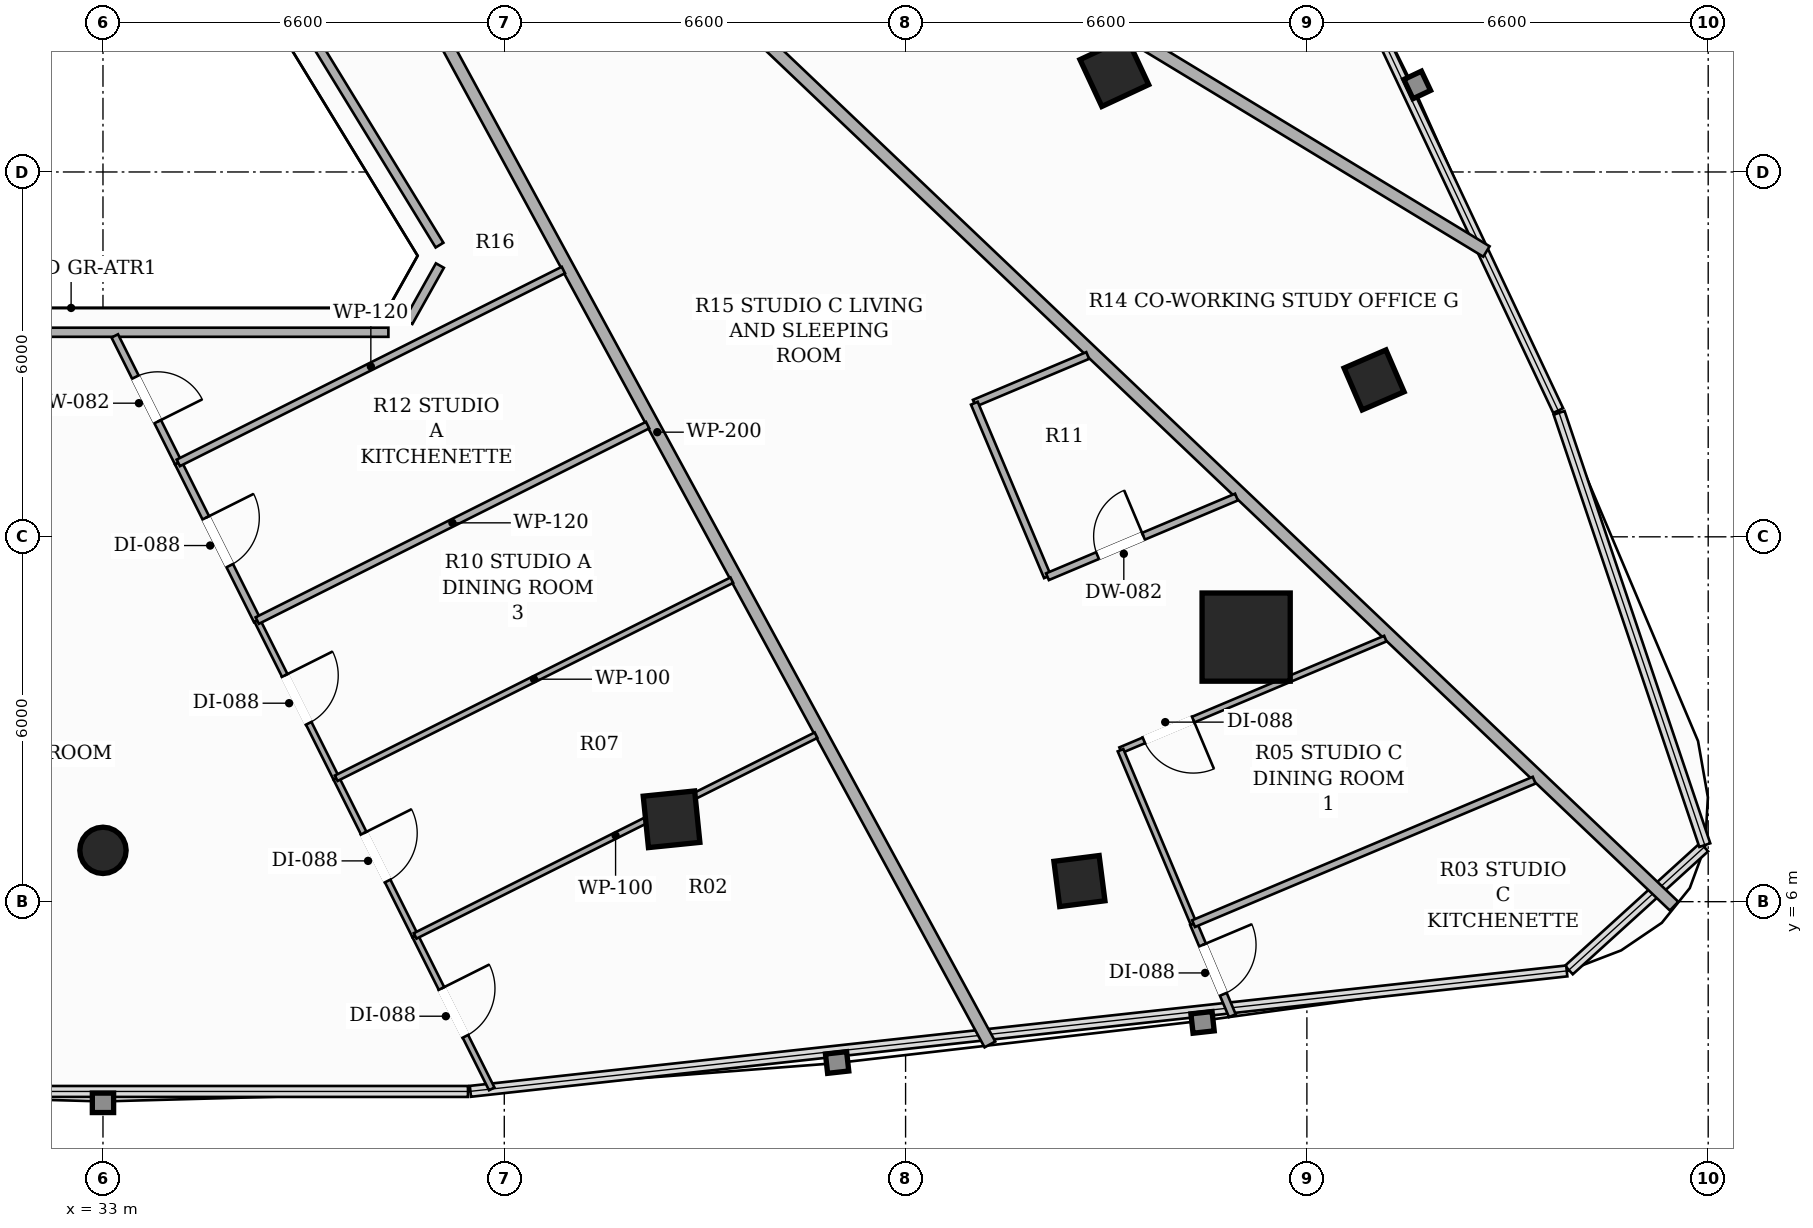
"""IFC4 building model, lengths in metres.
Left out: names, types, materials, properties, quantities, classifications, styles, units other than length and angle.
Written with IfcOpenShell. Run it as: python <this file> out.ifc"""

import sys

from ifc_helpers import new_model, si_unit, direction, frame, frame_2d, origin, origin_2d, place, context, subcontext, project, spatial, rectangle, hollow_rectangle, hollow_circle, extrude, element, fill, save


model = new_model("IFC4")
c1 = context("Model", 3, precision=1e-05, world=origin(), true_north=direction((0.0, 1.0)))
c2 = subcontext(c1, "Body", "Model", "MODEL_VIEW")
j1 = project(units=[si_unit("LENGTHUNIT", "METRE"), si_unit("PLANEANGLEUNIT", "RADIAN")], contexts=[c1])
p1 = place(None, origin())
s1 = spatial("IfcSite", under=j1, at=p1, CompositionType="ELEMENT")
p2 = place(p1, origin())
s2 = spatial("IfcBuilding", under=s1, at=p2, CompositionType="ELEMENT")
p3 = place(p2, frame((0.0, 0.0, 106.7)))
s3 = spatial("IfcBuildingStorey", under=s2, at=p3, CompositionType="ELEMENT", Elevation=106.7)
p4 = place(p3, frame((51.801, 10.351, 0.0), z_axis=(0.0, 0.0, 1.0), x_axis=(1.0, 0.0, 0.0)))
e1 = element("IfcColumn", 1, at=p4, inside=s3, PredefinedType="COLUMN", context=c2, shape_type="SweptSolid", body=[
    extrude(hollow_rectangle(XDim=1.45, YDim=1.45, WallThickness=0.045, at=origin_2d()), origin(), (0.0, 0.0, 1.0), 3.3),
])
p5 = place(p3, frame((33.0, 6.844, 0.0), z_axis=(0.0, 0.0, 1.0), x_axis=(1.0, 0.0, 0.0)))
e2 = element("IfcColumn", 2, at=p5, inside=s3, PredefinedType="COLUMN", context=c2, shape_type="SweptSolid", body=[
    extrude(hollow_circle(Radius=0.381, WallThickness=0.022, at=origin_2d()), origin(), (0.0, 0.0, 1.0), 3.3),
])
for number, where, z_axis, x_axis in (
    (3, (42.351, 7.355, 0.0), (0.0, 0.0, 1.0), (0.995, 0.101, 0.0)),
    (4, (49.633, 19.642, 0.0), (0.0, 0.0, 1.0), (-0.423, 0.906, 0.0)),
):
    element("IfcColumn", number, at=place(p3, frame(where, z_axis=z_axis, x_axis=x_axis)), inside=s3, PredefinedType="COLUMN", context=c2, shape_type="SweptSolid", body=[
        extrude(hollow_rectangle(XDim=0.85, YDim=0.85, WallThickness=0.028, at=origin_2d()), origin(), (0.0, 0.0, 1.0), 3.3),
    ])
for number, where, z_axis, x_axis in (
    (5, (49.059, 6.339, 0.0), (0.0, 0.0, 1.0), (0.992, 0.127, 0.0)),
    (6, (53.905, 14.58, 0.0), (0.0, 0.0, 1.0), (-0.397, 0.918, 0.0)),
):
    element("IfcColumn", number, at=place(p3, frame(where, z_axis=z_axis, x_axis=x_axis)), inside=s3, PredefinedType="COLUMN", context=c2, shape_type="SweptSolid", body=[
        extrude(hollow_rectangle(XDim=0.75, YDim=0.75, WallThickness=0.025, at=origin_2d()), origin(), (0.0, 0.0, 1.0), 3.3),
    ])
p6 = place(p3, frame((34.257, 23.79, 0.0), z_axis=(0.0, 0.0, 1.0), x_axis=(0.521839061235, -0.853043957935, 0.0)))
e7 = element("IfcWall", 7, at=p6, inside=s3, PredefinedType="PARTITIONING", context=c2, shape_type="SweptSolid", body=[
    extrude(rectangle(XDim=8.198, YDim=0.15, at=frame_2d((4.099, 0.0))), origin(), (0.0, 0.0, 1.0), 2.721),
])
p7 = place(p3, frame((38.541, 16.461, 0.0), z_axis=(0.0, 0.0, 1.0), x_axis=(-0.488631416095, -0.872490308946, 0.0)))
e8 = element("IfcWall", 8, at=p7, inside=s3, PredefinedType="PARTITIONING", context=c2, shape_type="SweptSolid", body=[
    extrude(rectangle(XDim=1.06, YDim=0.15, at=frame_2d((0.53, 0.0))), origin(), (0.0, 0.0, 1.0), 3.06),
])
p8 = place(p3, frame((37.694, 15.364, 0.0), z_axis=(0.0, 0.0, 1.0), x_axis=(-1.0, 0.0, 0.0)))
e9 = element("IfcWall", 9, at=p8, inside=s3, PredefinedType="PARTITIONING", context=c2, shape_type="SweptSolid", body=[
    extrude(rectangle(XDim=9.388, YDim=0.15, at=frame_2d((4.694, 0.0))), origin(), (0.0, 0.0, 1.0), 2.721),
])
p9 = place(p3, frame((36.646, 23.79, 0.0), z_axis=(0.0, 0.0, 1.0), x_axis=(0.477391569207, -0.878690667784, 0.0)))
e10 = element("IfcWall", 10, at=p9, inside=s3, PredefinedType="PARTITIONING", context=c2, shape_type="SweptSolid", body=[
    extrude(rectangle(XDim=22.918, YDim=0.2, at=frame_2d((11.459, 0.0))), origin(), (0.0, 0.0, 1.0), 2.413),
])
p10 = place(p3, frame((40.056, 23.79, 0.0), z_axis=(0.0, 0.0, 1.0), x_axis=(0.724633427165, -0.68913452695, 0.0)))
e11 = element("IfcWall", 11, at=p10, inside=s3, PredefinedType="PARTITIONING", context=c2, shape_type="SweptSolid", body=[
    extrude(rectangle(XDim=25.921, YDim=0.2, at=frame_2d((12.96, 0.0))), origin(), (0.0, 0.0, 1.0), 2.413),
])
p11 = place(p3, frame((55.753, 16.692, 0.0), z_axis=(0.0, 0.0, 1.0), x_axis=(-0.85489976131, 0.518793213248, 0.0)))
e12 = element("IfcWall", 12, at=p11, inside=s3, PredefinedType="PARTITIONING", context=c2, shape_type="SweptSolid", body=[
    extrude(rectangle(XDim=15.608, YDim=0.2, at=frame_2d((7.804, 0.0))), origin(), (0.0, 0.0, 1.0), 2.413),
])
p12 = place(p3, frame((33.194, 15.304, 0.0), z_axis=(0.0, 0.0, 1.0), x_axis=(0.447548179666, -0.894259820677, 0.0)))
e13 = element("IfcWall", 13, at=p12, inside=s3, PredefinedType="PARTITIONING", context=c2, shape_type="SweptSolid", body=[
    extrude(rectangle(XDim=2.335, YDim=0.12, at=frame_2d((1.167, 0.0))), origin(), (0.0, 0.0, 1.0), 2.721),
])
p13 = place(p12, frame((0.757, 0.0, 0.0)))
e14 = element("IfcOpeningElement", 14, at=p13, cuts=e13, PredefinedType="OPENING", context=c2, shape_type="SweptSolid", body=[
    extrude(rectangle(XDim=0.82, YDim=2.1, at=frame_2d((0.41, 1.05))), frame((0.0, 0.07, 0.0), z_axis=(0.0, -1.0, 0.0), x_axis=(1.0, 0.0, 0.0)), (0.0, 0.0, 1.0), 0.14),
])
p14 = place(p3, frame((34.239, 13.216, 0.0), z_axis=(0.0, 0.0, 1.0), x_axis=(0.447651342751, -0.894208183441, 0.0)))
e15 = element("IfcWall", 15, at=p14, inside=s3, PredefinedType="PARTITIONING", context=c2, shape_type="SweptSolid", body=[
    extrude(rectangle(XDim=2.9, YDim=0.12, at=frame_2d((1.45, 0.0))), origin(), (0.0, 0.0, 1.0), 3.06),
])
p15 = place(p14, frame((1.01, 0.0, 0.0)))
e16 = element("IfcOpeningElement", 16, at=p15, cuts=e15, PredefinedType="OPENING", context=c2, shape_type="SweptSolid", body=[
    extrude(rectangle(XDim=0.88, YDim=2.1, at=frame_2d((0.44, 1.05))), frame((0.0, 0.07, 0.0), z_axis=(0.0, -1.0, 0.0), x_axis=(1.0, 0.0, 0.0)), (0.0, 0.0, 1.0), 0.14),
])
p16 = place(p3, frame((38.134, 5.437, 0.0), z_axis=(0.0, 0.0, 1.0), x_axis=(0.447768773835, -0.894149386388, 0.0)))
e17 = element("IfcWall", 17, at=p16, inside=s3, PredefinedType="PARTITIONING", context=c2, shape_type="SweptSolid", body=[
    extrude(rectangle(XDim=2.814, YDim=0.1, at=frame_2d((1.407, 0.0))), origin(), (0.0, 0.0, 1.0), 3.06),
])
p17 = place(p16, frame((0.967, 0.0, 0.0)))
e18 = element("IfcOpeningElement", 18, at=p17, cuts=e17, PredefinedType="OPENING", context=c2, shape_type="SweptSolid", body=[
    extrude(rectangle(XDim=0.88, YDim=2.1, at=frame_2d((0.44, 1.05))), frame((0.0, 0.06, 0.0), z_axis=(0.0, -1.0, 0.0), x_axis=(1.0, 0.0, 0.0)), (0.0, 0.0, 1.0), 0.12),
])
p18 = place(p3, frame((36.836, 8.03, 0.0), z_axis=(0.0, 0.0, 1.0), x_axis=(0.447651342751, -0.894208183441, 0.0)))
e19 = element("IfcWall", 19, at=p18, inside=s3, PredefinedType="PARTITIONING", context=c2, shape_type="SweptSolid", body=[
    extrude(rectangle(XDim=2.9, YDim=0.1, at=frame_2d((1.45, 0.0))), origin(), (0.0, 0.0, 1.0), 2.413),
])
p19 = place(p18, frame((1.01, 0.0, 0.0)))
e20 = element("IfcOpeningElement", 20, at=p19, cuts=e19, PredefinedType="OPENING", context=c2, shape_type="SweptSolid", body=[
    extrude(rectangle(XDim=0.88, YDim=2.1, at=frame_2d((0.44, 1.05))), frame((0.0, 0.06, 0.0), z_axis=(0.0, -1.0, 0.0), x_axis=(1.0, 0.0, 0.0)), (0.0, 0.0, 1.0), 0.12),
])
p20 = place(p3, frame((35.537, 10.623, 0.0), z_axis=(0.0, 0.0, 1.0), x_axis=(0.447853271476, -0.894107066983, 0.0)))
e21 = element("IfcWall", 21, at=p20, inside=s3, PredefinedType="PARTITIONING", context=c2, shape_type="SweptSolid", body=[
    extrude(rectangle(XDim=2.9, YDim=0.1, at=frame_2d((1.45, 0.0))), origin(), (0.0, 0.0, 1.0), 3.06),
])
p21 = place(p20, frame((1.01, 0.0, 0.0)))
e22 = element("IfcOpeningElement", 22, at=p21, cuts=e21, PredefinedType="OPENING", context=c2, shape_type="SweptSolid", body=[
    extrude(rectangle(XDim=0.88, YDim=2.1, at=frame_2d((0.44, 1.05))), frame((0.0, 0.06, 0.0), z_axis=(0.0, -1.0, 0.0), x_axis=(1.0, 0.0, 0.0)), (0.0, 0.0, 1.0), 0.12),
])
p22 = place(p3, frame((40.572, 16.387, 0.0), z_axis=(0.0, 0.0, 1.0), x_axis=(-0.894178861749, -0.447709909653, 0.0)))
e23 = element("IfcWall", 23, at=p22, inside=s3, PredefinedType="PARTITIONING", context=c2, shape_type="SweptSolid", body=[
    extrude(rectangle(XDim=7.083, YDim=0.12, at=frame_2d((3.541, 0.0))), origin(), (0.0, 0.0, 1.0), 2.721),
])
p23 = place(p3, frame((41.957, 13.837, 0.0), z_axis=(0.0, 0.0, 1.0), x_axis=(-0.894209449688, -0.447648813344, 0.0)))
e24 = element("IfcWall", 24, at=p23, inside=s3, PredefinedType="PARTITIONING", context=c2, shape_type="SweptSolid", body=[
    extrude(rectangle(XDim=7.179, YDim=0.12, at=frame_2d((3.59, 0.0))), origin(), (0.0, 0.0, 1.0), 2.721),
])
p24 = place(p3, frame((38.134, 5.437, 0.0), z_axis=(0.0, 0.0, 1.0), x_axis=(0.894182030014, 0.447703581849, 0.0)))
e25 = element("IfcWall", 25, at=p24, inside=s3, PredefinedType="PARTITIONING", context=c2, shape_type="SweptSolid", body=[
    extrude(rectangle(XDim=7.373, YDim=0.1, at=frame_2d((3.687, 0.0))), origin(), (0.0, 0.0, 1.0), 2.413),
])
p25 = place(p3, frame((36.836, 8.03, 0.0), z_axis=(0.0, 0.0, 1.0), x_axis=(0.894205618721, 0.447656465884, 0.0)))
e26 = element("IfcWall", 26, at=p25, inside=s3, PredefinedType="PARTITIONING", context=c2, shape_type="SweptSolid", body=[
    extrude(rectangle(XDim=7.276, YDim=0.1, at=frame_2d((3.638, 0.0))), origin(), (0.0, 0.0, 1.0), 2.721),
])
p26 = place(p3, frame((49.195, 14.982, 0.0), z_axis=(0.0, 0.0, 1.0), x_axis=(-0.921624013763, -0.38808398222, 0.0)))
e27 = element("IfcWall", 27, at=p26, inside=s3, PredefinedType="PARTITIONING", context=c2, shape_type="SweptSolid", body=[
    extrude(rectangle(XDim=2.022, YDim=0.12, at=frame_2d((1.011, 0.0))), origin(), (0.0, 0.0, 1.0), 2.492),
])
p27 = place(p3, frame((47.331, 14.197, 0.0), z_axis=(0.0, 0.0, 1.0), x_axis=(0.388229743903, -0.921562621827, 0.0)))
e28 = element("IfcWall", 28, at=p27, inside=s3, PredefinedType="PARTITIONING", context=c2, shape_type="SweptSolid", body=[
    extrude(rectangle(XDim=3.096, YDim=0.12, at=frame_2d((1.548, 0.0))), origin(), (0.0, 0.0, 1.0), 3.06),
])
p28 = place(p3, frame((48.533, 11.344, 0.0), z_axis=(0.0, 0.0, 1.0), x_axis=(0.921534547548, 0.388296378653, 0.0)))
e29 = element("IfcWall", 29, at=p28, inside=s3, PredefinedType="PARTITIONING", context=c2, shape_type="SweptSolid", body=[
    extrude(rectangle(XDim=3.374, YDim=0.12, at=frame_2d((1.687, 0.0))), origin(), (0.0, 0.0, 1.0), 2.492),
])
p29 = place(p28, frame((0.894, 0.0, 0.0)))
e30 = element("IfcOpeningElement", 30, at=p29, cuts=e29, PredefinedType="OPENING", context=c2, shape_type="SweptSolid", body=[
    extrude(rectangle(XDim=0.82, YDim=2.1, at=frame_2d((0.41, 1.05))), frame((0.0, 0.07, 0.0), z_axis=(0.0, -1.0, 0.0), x_axis=(1.0, 0.0, 0.0)), (0.0, 0.0, 1.0), 0.14),
])
p30 = place(p3, frame((50.936, 5.639, 0.0), z_axis=(0.0, 0.0, 1.0), x_axis=(0.3883160894, -0.92152624201, 0.0)))
e31 = element("IfcWall", 31, at=p30, inside=s3, PredefinedType="PARTITIONING", context=c2, shape_type="SweptSolid", body=[
    extrude(rectangle(XDim=1.643, YDim=0.12, at=frame_2d((0.821, 0.0))), origin(), (0.0, 0.0, 1.0), 2.619),
])
p31 = place(p30, frame((0.381, 0.0, 0.0)))
e32 = element("IfcOpeningElement", 32, at=p31, cuts=e31, PredefinedType="OPENING", context=c2, shape_type="SweptSolid", body=[
    extrude(rectangle(XDim=0.88, YDim=2.1, at=frame_2d((0.44, 1.05))), frame((0.0, 0.07, 0.0), z_axis=(0.0, -1.0, 0.0), x_axis=(1.0, 0.0, 0.0)), (0.0, 0.0, 1.0), 0.14),
])
p32 = place(p3, frame((54.09, 10.326, 0.0), z_axis=(0.0, 0.0, 1.0), x_axis=(-0.921538100995, -0.388287945234, 0.0)))
e33 = element("IfcWall", 33, at=p32, inside=s3, PredefinedType="PARTITIONING", context=c2, shape_type="SweptSolid", body=[
    extrude(rectangle(XDim=4.726, YDim=0.1, at=frame_2d((2.363, 0.0))), origin(), (0.0, 0.0, 1.0), 2.413),
])
p33 = place(p32, frame((3.429, 0.0, 0.0)))
e34 = element("IfcOpeningElement", 34, at=p33, cuts=e33, PredefinedType="OPENING", context=c2, shape_type="SweptSolid", body=[
    extrude(rectangle(XDim=0.88, YDim=2.1, at=frame_2d((0.44, 1.05))), frame((0.0, 0.06, 0.0), z_axis=(0.0, -1.0, 0.0), x_axis=(1.0, 0.0, 0.0)), (0.0, 0.0, 1.0), 0.12),
])
p34 = place(p3, frame((49.735, 8.491, 0.0), z_axis=(0.0, 0.0, 1.0), x_axis=(0.388074634892, -0.921627949746, 0.0)))
e35 = element("IfcWall", 35, at=p34, inside=s3, PredefinedType="PARTITIONING", context=c2, shape_type="SweptSolid", body=[
    extrude(rectangle(XDim=3.094, YDim=0.1, at=frame_2d((1.547, 0.0))), origin(), (0.0, 0.0, 1.0), 2.413),
])
p35 = place(p3, frame((50.936, 5.639, 0.0), z_axis=(0.0, 0.0, 1.0), x_axis=(0.921613448603, 0.388109071466, 0.0)))
e36 = element("IfcWall", 36, at=p35, inside=s3, PredefinedType="PARTITIONING", context=c2, shape_type="SweptSolid", body=[
    extrude(rectangle(XDim=6.079, YDim=0.12, at=frame_2d((3.039, 0.0))), origin(), (0.0, 0.0, 1.0), 2.619),
])
p36 = place(p13, origin())
e37 = element("IfcDoor", 37, at=p36, inside=s3, OperationType="SINGLE_SWING_RIGHT", PredefinedType="DOOR", context=c2, shape_type="SweptSolid", body=[
    extrude(rectangle(XDim=0.82, YDim=2.1, at=frame_2d((0.41, 1.05))), frame((0.0, 0.025, 0.0), z_axis=(0.0, -1.0, 0.0), x_axis=(1.0, 0.0, 0.0)), (0.0, 0.0, 1.0), 0.05),
])
fill(e14, e37)
p37 = place(p15, origin())
e38 = element("IfcDoor", 38, at=p37, inside=s3, OperationType="SINGLE_SWING_LEFT", PredefinedType="DOOR", context=c2, shape_type="SweptSolid", body=[
    extrude(rectangle(XDim=0.88, YDim=2.1, at=frame_2d((0.44, 1.05))), frame((0.0, 0.025, 0.0), z_axis=(0.0, -1.0, 0.0), x_axis=(1.0, 0.0, 0.0)), (0.0, 0.0, 1.0), 0.05),
])
fill(e16, e38)
p38 = place(p17, origin())
e39 = element("IfcDoor", 39, at=p38, inside=s3, OperationType="SINGLE_SWING_LEFT", PredefinedType="DOOR", context=c2, shape_type="SweptSolid", body=[
    extrude(rectangle(XDim=0.88, YDim=2.1, at=frame_2d((0.44, 1.05))), frame((0.0, 0.025, 0.0), z_axis=(0.0, -1.0, 0.0), x_axis=(1.0, 0.0, 0.0)), (0.0, 0.0, 1.0), 0.05),
])
fill(e18, e39)
p39 = place(p19, origin())
e40 = element("IfcDoor", 40, at=p39, inside=s3, OperationType="SINGLE_SWING_LEFT", PredefinedType="DOOR", context=c2, shape_type="SweptSolid", body=[
    extrude(rectangle(XDim=0.88, YDim=2.1, at=frame_2d((0.44, 1.05))), frame((0.0, 0.025, 0.0), z_axis=(0.0, -1.0, 0.0), x_axis=(1.0, 0.0, 0.0)), (0.0, 0.0, 1.0), 0.05),
])
fill(e20, e40)
p40 = place(p21, origin())
e41 = element("IfcDoor", 41, at=p40, inside=s3, OperationType="SINGLE_SWING_LEFT", PredefinedType="DOOR", context=c2, shape_type="SweptSolid", body=[
    extrude(rectangle(XDim=0.88, YDim=2.1, at=frame_2d((0.44, 1.05))), frame((0.0, 0.025, 0.0), z_axis=(0.0, -1.0, 0.0), x_axis=(1.0, 0.0, 0.0)), (0.0, 0.0, 1.0), 0.05),
])
fill(e22, e41)
p41 = place(p29, origin())
e42 = element("IfcDoor", 42, at=p41, inside=s3, OperationType="SINGLE_SWING_RIGHT", PredefinedType="DOOR", context=c2, shape_type="SweptSolid", body=[
    extrude(rectangle(XDim=0.82, YDim=2.1, at=frame_2d((0.41, 1.05))), frame((0.0, 0.025, 0.0), z_axis=(0.0, -1.0, 0.0), x_axis=(1.0, 0.0, 0.0)), (0.0, 0.0, 1.0), 0.05),
])
fill(e30, e42)
p42 = place(p31, origin())
e43 = element("IfcDoor", 43, at=p42, inside=s3, OperationType="SINGLE_SWING_LEFT", PredefinedType="DOOR", context=c2, shape_type="SweptSolid", body=[
    extrude(rectangle(XDim=0.88, YDim=2.1, at=frame_2d((0.44, 1.05))), frame((0.0, 0.025, 0.0), z_axis=(0.0, -1.0, 0.0), x_axis=(1.0, 0.0, 0.0)), (0.0, 0.0, 1.0), 0.05),
])
fill(e32, e43)
p43 = place(p33, origin())
e44 = element("IfcDoor", 44, at=p43, inside=s3, OperationType="SINGLE_SWING_LEFT", PredefinedType="DOOR", context=c2, shape_type="SweptSolid", body=[
    extrude(rectangle(XDim=0.88, YDim=2.1, at=frame_2d((0.44, 1.05))), frame((0.0, 0.025, 0.0), z_axis=(0.0, -1.0, 0.0), x_axis=(1.0, 0.0, 0.0)), (0.0, 0.0, 1.0), 0.05),
])
fill(e34, e44)
save(model, sys.argv[1])
